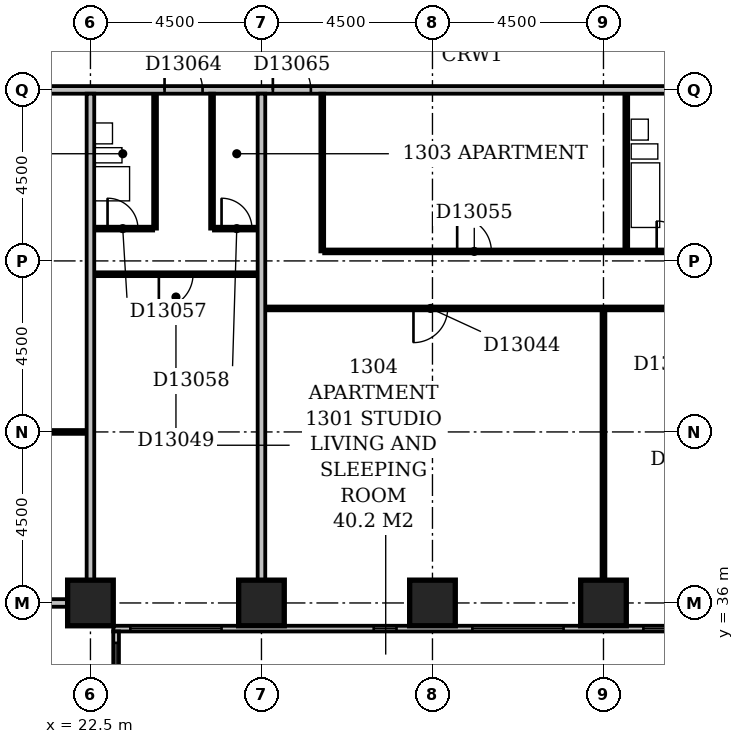
"""IFC4 building model, lengths in metres.
Left out: names, types, materials, properties, quantities, classifications, styles, units other than length and angle.
Written with IfcOpenShell. Run it as: python <this file> out.ifc"""

import sys

from ifc_helpers import new_model, si_unit, direction, frame, frame_2d, origin, origin_2d, place, context, subcontext, project, spatial, rectangle, extrude, element, fill, save


model = new_model("IFC4")
c1 = context("Model", 3, precision=1e-05, world=origin(), true_north=direction((0.0, 1.0)))
c2 = subcontext(c1, "Body", "Model", "MODEL_VIEW")
j1 = project(units=[si_unit("LENGTHUNIT", "METRE"), si_unit("PLANEANGLEUNIT", "RADIAN")], contexts=[c1])
p1 = place(None, origin())
s1 = spatial("IfcSite", under=j1, at=p1, CompositionType="ELEMENT")
p2 = place(p1, origin())
s2 = spatial("IfcBuilding", under=s1, at=p2, CompositionType="ELEMENT")
p3 = place(p2, frame((0.0, 0.0, 57.8)))
s3 = spatial("IfcBuildingStorey", under=s2, at=p3, CompositionType="ELEMENT", Elevation=57.8)
for number, where, z_axis, x_axis in (
    (1, (22.5, 36.0, -0.3), (0.0, 0.0, 1.0), (1.0, 0.0, 0.0)),
    (2, (27.0, 36.0, -0.3), (0.0, 0.0, 1.0), (1.0, 0.0, 0.0)),
    (3, (31.5, 36.0, -0.3), (0.0, 0.0, 1.0), (1.0, 0.0, 0.0)),
    (4, (36.0, 36.0, -0.3), (0.0, 0.0, 1.0), (1.0, 0.0, 0.0)),
):
    element("IfcColumn", number, at=place(p3, frame(where, z_axis=z_axis, x_axis=x_axis)), inside=s3, PredefinedType="COLUMN", context=c2, shape_type="SweptSolid", body=[
        extrude(rectangle(XDim=1.2, YDim=1.2, at=origin_2d()), origin(), (0.0, 0.0, 1.0), 3.6),
    ])
p4 = place(p3, frame((23.175, 17.4, 0.0), z_axis=(0.0, 0.0, 1.0), x_axis=(0.0, 1.0, 0.0)))
e5 = element("IfcWall", 5, at=p4, inside=s3, PredefinedType="STANDARD", context=c2, shape_type="SweptSolid", body=[
    extrude(rectangle(XDim=17.85, YDim=0.15, at=frame_2d((8.925, 0.0))), origin(), (0.0, 0.0, 1.0), 2.7),
])
p5 = place(p4, frame((1.65, 0.0, 0.6)))
e6 = element("IfcOpeningElement", 6, at=p5, cuts=e5, PredefinedType="OPENING", context=c2, shape_type="SweptSolid", body=[
    extrude(rectangle(XDim=2.4, YDim=1.8, at=frame_2d((1.2, 0.9))), frame((0.0, 0.087, 0.0), z_axis=(0.0, -1.0, 0.0), x_axis=(1.0, 0.0, 0.0)), (0.0, 0.0, 1.0), 0.174),
])
p6 = place(p4, frame((6.006, 0.0, 0.6)))
e7 = element("IfcOpeningElement", 7, at=p6, cuts=e5, PredefinedType="OPENING", context=c2, shape_type="SweptSolid", body=[
    extrude(rectangle(XDim=0.6, YDim=1.8, at=frame_2d((0.3, 0.9))), frame((0.0, 0.087, 0.0), z_axis=(0.0, -1.0, 0.0), x_axis=(1.0, 0.0, 0.0)), (0.0, 0.0, 1.0), 0.174),
])
p7 = place(p4, frame((10.65, 0.0, 0.6)))
e8 = element("IfcOpeningElement", 8, at=p7, cuts=e5, PredefinedType="OPENING", context=c2, shape_type="SweptSolid", body=[
    extrude(rectangle(XDim=2.4, YDim=1.8, at=frame_2d((1.2, 0.9))), frame((0.0, 0.087, 0.0), z_axis=(0.0, -1.0, 0.0), x_axis=(1.0, 0.0, 0.0)), (0.0, 0.0, 1.0), 0.174),
])
p8 = place(p4, frame((15.15, 0.0, 0.6)))
e9 = element("IfcOpeningElement", 9, at=p8, cuts=e5, PredefinedType="OPENING", context=c2, shape_type="SweptSolid", body=[
    extrude(rectangle(XDim=2.4, YDim=1.8, at=frame_2d((1.2, 0.9))), frame((0.0, 0.087, 0.0), z_axis=(0.0, -1.0, 0.0), x_axis=(1.0, 0.0, 0.0)), (0.0, 0.0, 1.0), 0.174),
])
p9 = place(p3, frame((23.1, 35.325, 0.0), z_axis=(0.0, 0.0, 1.0), x_axis=(1.0, 0.0, 0.0)))
e10 = element("IfcWall", 10, at=p9, inside=s3, PredefinedType="STANDARD", context=c2, shape_type="SweptSolid", body=[
    extrude(rectangle(XDim=45.15, YDim=0.15, at=frame_2d((22.575, 0.0))), origin(), (0.0, 0.0, 1.0), 2.7),
])
p10 = place(p9, frame((0.45, 0.0, 0.6)))
e11 = element("IfcOpeningElement", 11, at=p10, cuts=e10, PredefinedType="OPENING", context=c2, shape_type="SweptSolid", body=[
    extrude(rectangle(XDim=2.4, YDim=1.8, at=frame_2d((1.2, 0.9))), frame((0.0, 0.087, 0.0), z_axis=(0.0, -1.0, 0.0), x_axis=(1.0, 0.0, 0.0)), (0.0, 0.0, 1.0), 0.174),
])
p11 = place(p9, frame((6.854, 0.0, 0.6)))
e12 = element("IfcOpeningElement", 12, at=p11, cuts=e10, PredefinedType="OPENING", context=c2, shape_type="SweptSolid", body=[
    extrude(rectangle(XDim=0.6, YDim=1.8, at=frame_2d((0.3, 0.9))), frame((0.0, 0.087, 0.0), z_axis=(0.0, -1.0, 0.0), x_axis=(1.0, 0.0, 0.0)), (0.0, 0.0, 1.0), 0.174),
])
p12 = place(p9, frame((9.45, 0.0, 0.6)))
e13 = element("IfcOpeningElement", 13, at=p12, cuts=e10, PredefinedType="OPENING", context=c2, shape_type="SweptSolid", body=[
    extrude(rectangle(XDim=2.4, YDim=1.8, at=frame_2d((1.2, 0.9))), frame((0.0, 0.087, 0.0), z_axis=(0.0, -1.0, 0.0), x_axis=(1.0, 0.0, 0.0)), (0.0, 0.0, 1.0), 0.174),
])
p13 = place(p9, frame((13.95, 0.0, 0.6)))
e14 = element("IfcOpeningElement", 14, at=p13, cuts=e10, PredefinedType="OPENING", context=c2, shape_type="SweptSolid", body=[
    extrude(rectangle(XDim=2.4, YDim=1.8, at=frame_2d((1.2, 0.9))), frame((0.0, 0.087, 0.0), z_axis=(0.0, -1.0, 0.0), x_axis=(1.0, 0.0, 0.0)), (0.0, 0.0, 1.0), 0.174),
])
p14 = place(p9, frame((18.323, 0.0, 0.6)))
e15 = element("IfcOpeningElement", 15, at=p14, cuts=e10, PredefinedType="OPENING", context=c2, shape_type="SweptSolid", body=[
    extrude(rectangle(XDim=1.2, YDim=1.8, at=frame_2d((0.6, 0.9))), frame((0.0, 0.087, 0.0), z_axis=(0.0, -1.0, 0.0), x_axis=(1.0, 0.0, 0.0)), (0.0, 0.0, 1.0), 0.174),
])
p15 = place(p9, frame((22.95, 0.0, 0.6)))
e16 = element("IfcOpeningElement", 16, at=p15, cuts=e10, PredefinedType="OPENING", context=c2, shape_type="SweptSolid", body=[
    extrude(rectangle(XDim=2.4, YDim=1.8, at=frame_2d((1.2, 0.9))), frame((0.0, 0.087, 0.0), z_axis=(0.0, -1.0, 0.0), x_axis=(1.0, 0.0, 0.0)), (0.0, 0.0, 1.0), 0.174),
])
p16 = place(p9, frame((27.45, 0.0, 0.6)))
e17 = element("IfcOpeningElement", 17, at=p16, cuts=e10, PredefinedType="OPENING", context=c2, shape_type="SweptSolid", body=[
    extrude(rectangle(XDim=2.4, YDim=1.8, at=frame_2d((1.2, 0.9))), frame((0.0, 0.087, 0.0), z_axis=(0.0, -1.0, 0.0), x_axis=(1.0, 0.0, 0.0)), (0.0, 0.0, 1.0), 0.174),
])
p17 = place(p9, frame((31.706, 0.0, 0.6)))
e18 = element("IfcOpeningElement", 18, at=p17, cuts=e10, PredefinedType="OPENING", context=c2, shape_type="SweptSolid", body=[
    extrude(rectangle(XDim=1.2, YDim=1.8, at=frame_2d((0.6, 0.9))), frame((0.0, 0.087, 0.0), z_axis=(0.0, -1.0, 0.0), x_axis=(1.0, 0.0, 0.0)), (0.0, 0.0, 1.0), 0.174),
])
p18 = place(p9, frame((36.45, 0.0, 0.6)))
e19 = element("IfcOpeningElement", 19, at=p18, cuts=e10, PredefinedType="OPENING", context=c2, shape_type="SweptSolid", body=[
    extrude(rectangle(XDim=2.4, YDim=1.8, at=frame_2d((1.2, 0.9))), frame((0.0, 0.087, 0.0), z_axis=(0.0, -1.0, 0.0), x_axis=(1.0, 0.0, 0.0)), (0.0, 0.0, 1.0), 0.174),
])
p19 = place(p9, frame((40.95, 0.0, 0.6)))
e20 = element("IfcOpeningElement", 20, at=p19, cuts=e10, PredefinedType="OPENING", context=c2, shape_type="SweptSolid", body=[
    extrude(rectangle(XDim=2.4, YDim=1.8, at=frame_2d((1.2, 0.9))), frame((0.0, 0.087, 0.0), z_axis=(0.0, -1.0, 0.0), x_axis=(1.0, 0.0, 0.0)), (0.0, 0.0, 1.0), 0.174),
])
p20 = place(p3, frame((9.1, 36.0, 0.0), z_axis=(0.0, 0.0, 1.0), x_axis=(1.0, 0.0, 0.0)))
e21 = element("IfcWall", 21, at=p20, inside=s3, PredefinedType="PARTITIONING", context=c2, shape_type="SweptSolid", body=[
    extrude(rectangle(XDim=12.8, YDim=0.2, at=frame_2d((6.4, 0.0))), origin(), (0.0, 0.0, 1.0), 2.4),
])
p21 = place(p3, frame((22.5, 36.6, 0.0), z_axis=(0.0, 0.0, 1.0), x_axis=(0.0, 1.0, 0.0)))
e22 = element("IfcWall", 22, at=p21, inside=s3, PredefinedType="PARTITIONING", context=c2, shape_type="SweptSolid", body=[
    extrude(rectangle(XDim=12.8, YDim=0.2, at=frame_2d((6.4, 0.0))), origin(), (0.0, 0.0, 1.0), 3.3),
])
p22 = place(p3, frame((27.0, 36.6, 0.0), z_axis=(0.0, 0.0, 1.0), x_axis=(0.0, 1.0, 0.0)))
e23 = element("IfcWall", 23, at=p22, inside=s3, PredefinedType="PARTITIONING", context=c2, shape_type="SweptSolid", body=[
    extrude(rectangle(XDim=12.8, YDim=0.2, at=frame_2d((6.4, 0.0))), origin(), (0.0, 0.0, 1.0), 2.6),
])
p23 = place(p3, frame((36.0, 36.6, 0.0), z_axis=(0.0, 0.0, 1.0), x_axis=(0.0, 1.0, 0.0)))
e24 = element("IfcWall", 24, at=p23, inside=s3, PredefinedType="PARTITIONING", context=c2, shape_type="SweptSolid", body=[
    extrude(rectangle(XDim=7.1, YDim=0.1, at=frame_2d((3.55, 0.0))), origin(), (0.0, 0.0, 1.0), 2.4),
])
p24 = place(p3, frame((9.1, 40.5, 0.0), z_axis=(0.0, 0.0, 1.0), x_axis=(1.0, 0.0, 0.0)))
e25 = element("IfcWall", 25, at=p24, inside=s3, PredefinedType="PARTITIONING", context=c2, shape_type="SweptSolid", body=[
    extrude(rectangle(XDim=13.3, YDim=0.1, at=frame_2d((6.65, 0.0))), origin(), (0.0, 0.0, 1.0), 3.3),
])
p25 = place(p3, frame((27.1, 43.75, 0.0), z_axis=(0.0, 0.0, 1.0), x_axis=(1.0, 0.0, 0.0)))
e26 = element("IfcWall", 26, at=p25, inside=s3, PredefinedType="PARTITIONING", context=c2, shape_type="SweptSolid", body=[
    extrude(rectangle(XDim=13.3, YDim=0.1, at=frame_2d((6.65, 0.0))), origin(), (0.0, 0.0, 1.0), 3.3),
])
p26 = place(p25, frame((3.9, 0.0, 0.0)))
e27 = element("IfcOpeningElement", 27, at=p26, cuts=e26, PredefinedType="OPENING", context=c2, shape_type="SweptSolid", body=[
    extrude(rectangle(XDim=0.9, YDim=2.1, at=frame_2d((0.45, 1.05))), frame((0.0, 0.062, 0.0), z_axis=(0.0, -1.0, 0.0), x_axis=(1.0, 0.0, 0.0)), (0.0, 0.0, 1.0), 0.124),
])
p27 = place(p25, frame((10.7, 0.0, 0.0)))
e28 = element("IfcOpeningElement", 28, at=p27, cuts=e26, PredefinedType="OPENING", context=c2, shape_type="SweptSolid", body=[
    extrude(rectangle(XDim=0.9, YDim=2.1, at=frame_2d((0.45, 1.05))), frame((0.0, 0.062, 0.0), z_axis=(0.0, -1.0, 0.0), x_axis=(1.0, 0.0, 0.0)), (0.0, 0.0, 1.0), 0.124),
])
p28 = place(p3, frame((22.6, 44.65, 0.0), z_axis=(0.0, 0.0, 1.0), x_axis=(1.0, 0.0, 0.0)))
e29 = element("IfcWall", 29, at=p28, inside=s3, PredefinedType="PARTITIONING", context=c2, shape_type="SweptSolid", body=[
    extrude(rectangle(XDim=4.3, YDim=0.1, at=frame_2d((2.15, 0.0))), origin(), (0.0, 0.0, 1.0), 3.3),
])
p29 = place(p28, frame((1.7, 0.0, 0.0)))
e30 = element("IfcOpeningElement", 30, at=p29, cuts=e29, PredefinedType="OPENING", context=c2, shape_type="SweptSolid", body=[
    extrude(rectangle(XDim=0.9, YDim=2.1, at=frame_2d((0.45, 1.05))), frame((0.0, 0.062, 0.0), z_axis=(0.0, -1.0, 0.0), x_axis=(1.0, 0.0, 0.0)), (0.0, 0.0, 1.0), 0.124),
])
p30 = place(p3, frame((28.6, 45.25, 0.0), z_axis=(0.0, 0.0, 1.0), x_axis=(0.0, 1.0, 0.0)))
e31 = element("IfcWall", 31, at=p30, inside=s3, PredefinedType="PARTITIONING", context=c2, shape_type="SweptSolid", body=[
    extrude(rectangle(XDim=4.15, YDim=0.1, at=frame_2d((2.075, 0.0))), origin(), (0.0, 0.0, 1.0), 3.3),
])
p31 = place(p3, frame((28.65, 45.25, 0.0), z_axis=(0.0, 0.0, 1.0), x_axis=(1.0, 0.0, 0.0)))
e32 = element("IfcWall", 32, at=p31, inside=s3, PredefinedType="PARTITIONING", context=c2, shape_type="SweptSolid", body=[
    extrude(rectangle(XDim=11.75, YDim=0.1, at=frame_2d((5.875, 0.0))), origin(), (0.0, 0.0, 1.0), 3.3),
])
p32 = place(p31, frame((8.75, 0.0, 0.0)))
e33 = element("IfcOpeningElement", 33, at=p32, cuts=e32, PredefinedType="OPENING", context=c2, shape_type="SweptSolid", body=[
    extrude(rectangle(XDim=0.8, YDim=2.1, at=frame_2d((0.4, 1.05))), frame((0.0, 0.062, 0.0), z_axis=(0.0, -1.0, 0.0), x_axis=(1.0, 0.0, 0.0)), (0.0, 0.0, 1.0), 0.124),
])
p33 = place(p31, frame((3.5, 0.0, 0.0)))
e34 = element("IfcOpeningElement", 34, at=p33, cuts=e32, PredefinedType="OPENING", context=c2, shape_type="SweptSolid", body=[
    extrude(rectangle(XDim=0.9, YDim=2.1, at=frame_2d((0.45, 1.05))), frame((0.0, 0.062, 0.0), z_axis=(0.0, -1.0, 0.0), x_axis=(1.0, 0.0, 0.0)), (0.0, 0.0, 1.0), 0.124),
])
p34 = place(p31, frame((10.7, 0.0, 0.0)))
e35 = element("IfcOpeningElement", 35, at=p34, cuts=e32, PredefinedType="OPENING", context=c2, shape_type="SweptSolid", body=[
    extrude(rectangle(XDim=0.8, YDim=2.1, at=frame_2d((0.4, 1.05))), frame((0.0, 0.062, 0.0), z_axis=(0.0, -1.0, 0.0), x_axis=(1.0, 0.0, 0.0)), (0.0, 0.0, 1.0), 0.124),
])
p35 = place(p3, frame((36.6, 45.3, 0.0), z_axis=(0.0, 0.0, 1.0), x_axis=(0.0, 1.0, 0.0)))
e36 = element("IfcWall", 36, at=p35, inside=s3, PredefinedType="PLUMBINGWALL", context=c2, shape_type="SweptSolid", body=[
    extrude(rectangle(XDim=4.1, YDim=0.1, at=frame_2d((2.05, 0.0))), origin(), (0.0, 0.0, 1.0), 2.4),
])
p36 = place(p3, frame((22.6, 45.85, 0.0), z_axis=(0.0, 0.0, 1.0), x_axis=(1.0, 0.0, 0.0)))
e37 = element("IfcWall", 37, at=p36, inside=s3, PredefinedType="PARTITIONING", context=c2, shape_type="SweptSolid", body=[
    extrude(rectangle(XDim=1.55, YDim=0.1, at=frame_2d((0.775, 0.0))), origin(), (0.0, 0.0, 1.0), 3.3),
])
p37 = place(p36, frame((0.35, 0.0, 0.0)))
e38 = element("IfcOpeningElement", 38, at=p37, cuts=e37, PredefinedType="OPENING", context=c2, shape_type="SweptSolid", body=[
    extrude(rectangle(XDim=0.8, YDim=2.1, at=frame_2d((0.4, 1.05))), frame((0.0, 0.062, 0.0), z_axis=(0.0, -1.0, 0.0), x_axis=(1.0, 0.0, 0.0)), (0.0, 0.0, 1.0), 0.124),
])
p38 = place(p3, frame((24.2, 45.85, 0.0), z_axis=(0.0, 0.0, 1.0), x_axis=(0.0, 1.0, 0.0)))
e39 = element("IfcWall", 39, at=p38, inside=s3, PredefinedType="PLUMBINGWALL", context=c2, shape_type="SweptSolid", body=[
    extrude(rectangle(XDim=3.55, YDim=0.1, at=frame_2d((1.775, 0.0))), origin(), (0.0, 0.0, 1.0), 3.3),
])
p39 = place(p3, frame((25.7, 45.85, 0.0), z_axis=(0.0, 0.0, 1.0), x_axis=(0.0, 1.0, 0.0)))
e40 = element("IfcWall", 40, at=p39, inside=s3, PredefinedType="PARTITIONING", context=c2, shape_type="SweptSolid", body=[
    extrude(rectangle(XDim=3.55, YDim=0.1, at=frame_2d((1.775, 0.0))), origin(), (0.0, 0.0, 1.0), 3.3),
])
p40 = place(p3, frame((25.75, 45.85, 0.0), z_axis=(0.0, 0.0, 1.0), x_axis=(1.0, 0.0, 0.0)))
e41 = element("IfcWall", 41, at=p40, inside=s3, PredefinedType="PARTITIONING", context=c2, shape_type="SweptSolid", body=[
    extrude(rectangle(XDim=1.15, YDim=0.1, at=frame_2d((0.575, 0.0))), origin(), (0.0, 0.0, 1.0), 3.3),
])
p41 = place(p40, frame((0.2, 0.0, 0.0)))
e42 = element("IfcOpeningElement", 42, at=p41, cuts=e41, PredefinedType="OPENING", context=c2, shape_type="SweptSolid", body=[
    extrude(rectangle(XDim=0.8, YDim=2.1, at=frame_2d((0.4, 1.05))), frame((0.0, 0.062, 0.0), z_axis=(0.0, -1.0, 0.0), x_axis=(1.0, 0.0, 0.0)), (0.0, 0.0, 1.0), 0.124),
])
p42 = place(p3, frame((9.1, 49.5, 0.0), z_axis=(0.0, 0.0, 1.0), x_axis=(1.0, 0.0, 0.0)))
e43 = element("IfcWall", 43, at=p42, inside=s3, PredefinedType="PARTITIONING", context=c2, shape_type="SweptSolid", body=[
    extrude(rectangle(XDim=57.8, YDim=0.2, at=frame_2d((28.9, 0.0))), origin(), (0.0, 0.0, 1.0), 3.3),
])
p43 = place(p42, frame((15.35, 0.0, 0.0)))
e44 = element("IfcOpeningElement", 44, at=p43, cuts=e43, PredefinedType="OPENING", context=c2, shape_type="SweptSolid", body=[
    extrude(rectangle(XDim=1.0, YDim=2.1, at=frame_2d((0.5, 1.05))), frame((0.0, 0.112, 0.0), z_axis=(0.0, -1.0, 0.0), x_axis=(1.0, 0.0, 0.0)), (0.0, 0.0, 1.0), 0.224),
])
p44 = place(p42, frame((18.2, 0.0, 0.0)))
e45 = element("IfcOpeningElement", 45, at=p44, cuts=e43, PredefinedType="OPENING", context=c2, shape_type="SweptSolid", body=[
    extrude(rectangle(XDim=1.0, YDim=2.1, at=frame_2d((0.5, 1.05))), frame((0.0, 0.112, 0.0), z_axis=(0.0, -1.0, 0.0), x_axis=(1.0, 0.0, 0.0)), (0.0, 0.0, 1.0), 0.224),
])
p45 = place(p42, frame((39.6, 0.0, 0.0)))
e46 = element("IfcOpeningElement", 46, at=p45, cuts=e43, PredefinedType="OPENING", context=c2, shape_type="SweptSolid", body=[
    extrude(rectangle(XDim=1.0, YDim=2.1, at=frame_2d((0.5, 1.05))), frame((0.0, 0.112, 0.0), z_axis=(0.0, -1.0, 0.0), x_axis=(1.0, 0.0, 0.0)), (0.0, 0.0, 1.0), 0.224),
])
p46 = place(p42, frame((45.2, 0.0, 0.0)))
e47 = element("IfcOpeningElement", 47, at=p46, cuts=e43, PredefinedType="OPENING", context=c2, shape_type="SweptSolid", body=[
    extrude(rectangle(XDim=1.0, YDim=2.1, at=frame_2d((0.5, 1.05))), frame((0.0, 0.112, 0.0), z_axis=(0.0, -1.0, 0.0), x_axis=(1.0, 0.0, 0.0)), (0.0, 0.0, 1.0), 0.224),
])
p47 = place(p42, frame((54.15, 0.0, 0.0)))
e48 = element("IfcOpeningElement", 48, at=p47, cuts=e43, PredefinedType="OPENING", context=c2, shape_type="SweptSolid", body=[
    extrude(rectangle(XDim=1.0, YDim=2.1, at=frame_2d((0.5, 1.05))), frame((0.0, 0.112, 0.0), z_axis=(0.0, -1.0, 0.0), x_axis=(1.0, 0.0, 0.0)), (0.0, 0.0, 1.0), 0.224),
])
p48 = place(p42, frame((6.15, 0.0, 0.0)))
e49 = element("IfcOpeningElement", 49, at=p48, cuts=e43, PredefinedType="OPENING", context=c2, shape_type="SweptSolid", body=[
    extrude(rectangle(XDim=0.9, YDim=2.1, at=frame_2d((0.45, 1.05))), frame((0.0, 0.112, 0.0), z_axis=(0.0, -1.0, 0.0), x_axis=(1.0, 0.0, 0.0)), (0.0, 0.0, 1.0), 0.224),
])
p49 = place(p8, origin())
e50 = element("IfcWindow", 50, at=p49, inside=s3, PartitioningType="SINGLE_PANEL", PredefinedType="WINDOW", context=c2, shape_type="SweptSolid", body=[
    extrude(rectangle(XDim=2.4, YDim=1.8, at=frame_2d((1.2, 0.9))), frame((0.0, 0.03, 0.0), z_axis=(0.0, -1.0, 0.0), x_axis=(1.0, 0.0, 0.0)), (0.0, 0.0, 1.0), 0.06),
])
fill(e9, e50)
p50 = place(p10, origin())
e51 = element("IfcWindow", 51, at=p50, inside=s3, PartitioningType="SINGLE_PANEL", PredefinedType="WINDOW", context=c2, shape_type="SweptSolid", body=[
    extrude(rectangle(XDim=2.4, YDim=1.8, at=frame_2d((1.2, 0.9))), frame((0.0, 0.03, 0.0), z_axis=(0.0, -1.0, 0.0), x_axis=(1.0, 0.0, 0.0)), (0.0, 0.0, 1.0), 0.06),
])
fill(e11, e51)
p51 = place(p11, origin())
e52 = element("IfcWindow", 52, at=p51, inside=s3, PartitioningType="SINGLE_PANEL", PredefinedType="WINDOW", context=c2, shape_type="SweptSolid", body=[
    extrude(rectangle(XDim=0.6, YDim=1.8, at=frame_2d((0.3, 0.9))), frame((0.0, 0.03, 0.0), z_axis=(0.0, -1.0, 0.0), x_axis=(1.0, 0.0, 0.0)), (0.0, 0.0, 1.0), 0.06),
])
fill(e12, e52)
p52 = place(p12, origin())
e53 = element("IfcWindow", 53, at=p52, inside=s3, PartitioningType="SINGLE_PANEL", PredefinedType="WINDOW", context=c2, shape_type="SweptSolid", body=[
    extrude(rectangle(XDim=2.4, YDim=1.8, at=frame_2d((1.2, 0.9))), frame((0.0, 0.03, 0.0), z_axis=(0.0, -1.0, 0.0), x_axis=(1.0, 0.0, 0.0)), (0.0, 0.0, 1.0), 0.06),
])
fill(e13, e53)
p53 = place(p13, origin())
e54 = element("IfcWindow", 54, at=p53, inside=s3, PartitioningType="SINGLE_PANEL", PredefinedType="WINDOW", context=c2, shape_type="SweptSolid", body=[
    extrude(rectangle(XDim=2.4, YDim=1.8, at=frame_2d((1.2, 0.9))), frame((0.0, 0.03, 0.0), z_axis=(0.0, -1.0, 0.0), x_axis=(1.0, 0.0, 0.0)), (0.0, 0.0, 1.0), 0.06),
])
fill(e14, e54)
p54 = place(p26, frame((0.9, 0.0, 0.0), z_axis=(0.0, 0.0, 1.0), x_axis=(-1.0, 0.0, 0.0)))
e55 = element("IfcDoor", 55, at=p54, inside=s3, OperationType="SINGLE_SWING_RIGHT", PredefinedType="DOOR", context=c2, shape_type="SweptSolid", body=[
    extrude(rectangle(XDim=0.9, YDim=2.1, at=frame_2d((0.45, 1.05))), frame((0.0, 0.025, 0.0), z_axis=(0.0, -1.0, 0.0), x_axis=(1.0, 0.0, 0.0)), (0.0, 0.0, 1.0), 0.05),
])
fill(e27, e55)
p55 = place(p29, frame((0.9, 0.0, 0.0), z_axis=(0.0, 0.0, 1.0), x_axis=(-1.0, 0.0, 0.0)))
e56 = element("IfcDoor", 56, at=p55, inside=s3, OperationType="SINGLE_SWING_RIGHT", PredefinedType="DOOR", context=c2, shape_type="SweptSolid", body=[
    extrude(rectangle(XDim=0.9, YDim=2.1, at=frame_2d((0.45, 1.05))), frame((0.0, 0.025, 0.0), z_axis=(0.0, -1.0, 0.0), x_axis=(1.0, 0.0, 0.0)), (0.0, 0.0, 1.0), 0.05),
])
fill(e30, e56)
p56 = place(p32, origin())
e57 = element("IfcDoor", 57, at=p56, inside=s3, OperationType="SINGLE_SWING_LEFT", PredefinedType="DOOR", context=c2, shape_type="SweptSolid", body=[
    extrude(rectangle(XDim=0.8, YDim=2.1, at=frame_2d((0.4, 1.05))), frame((0.0, 0.025, 0.0), z_axis=(0.0, -1.0, 0.0), x_axis=(1.0, 0.0, 0.0)), (0.0, 0.0, 1.0), 0.05),
])
fill(e33, e57)
p57 = place(p33, origin())
e58 = element("IfcDoor", 58, at=p57, inside=s3, OperationType="SINGLE_SWING_LEFT", PredefinedType="DOOR", context=c2, shape_type="SweptSolid", body=[
    extrude(rectangle(XDim=0.9, YDim=2.1, at=frame_2d((0.45, 1.05))), frame((0.0, 0.025, 0.0), z_axis=(0.0, -1.0, 0.0), x_axis=(1.0, 0.0, 0.0)), (0.0, 0.0, 1.0), 0.05),
])
fill(e34, e58)
p58 = place(p37, origin())
e59 = element("IfcDoor", 59, at=p58, inside=s3, OperationType="SINGLE_SWING_LEFT", PredefinedType="DOOR", context=c2, shape_type="SweptSolid", body=[
    extrude(rectangle(XDim=0.8, YDim=2.1, at=frame_2d((0.4, 1.05))), frame((0.0, 0.025, 0.0), z_axis=(0.0, -1.0, 0.0), x_axis=(1.0, 0.0, 0.0)), (0.0, 0.0, 1.0), 0.05),
])
fill(e38, e59)
p59 = place(p41, origin())
e60 = element("IfcDoor", 60, at=p59, inside=s3, OperationType="SINGLE_SWING_LEFT", PredefinedType="DOOR", context=c2, shape_type="SweptSolid", body=[
    extrude(rectangle(XDim=0.8, YDim=2.1, at=frame_2d((0.4, 1.05))), frame((0.0, 0.025, 0.0), z_axis=(0.0, -1.0, 0.0), x_axis=(1.0, 0.0, 0.0)), (0.0, 0.0, 1.0), 0.05),
])
fill(e42, e60)
p60 = place(p43, origin())
e61 = element("IfcDoor", 61, at=p60, inside=s3, OperationType="SINGLE_SWING_LEFT", PredefinedType="DOOR", context=c2, shape_type="SweptSolid", body=[
    extrude(rectangle(XDim=1.0, YDim=2.1, at=frame_2d((0.5, 1.05))), frame((0.0, 0.025, 0.0), z_axis=(0.0, -1.0, 0.0), x_axis=(1.0, 0.0, 0.0)), (0.0, 0.0, 1.0), 0.05),
])
fill(e44, e61)
p61 = place(p44, origin())
e62 = element("IfcDoor", 62, at=p61, inside=s3, OperationType="SINGLE_SWING_LEFT", PredefinedType="DOOR", context=c2, shape_type="SweptSolid", body=[
    extrude(rectangle(XDim=1.0, YDim=2.1, at=frame_2d((0.5, 1.05))), frame((0.0, 0.025, 0.0), z_axis=(0.0, -1.0, 0.0), x_axis=(1.0, 0.0, 0.0)), (0.0, 0.0, 1.0), 0.05),
])
fill(e45, e62)
save(model, sys.argv[1])
